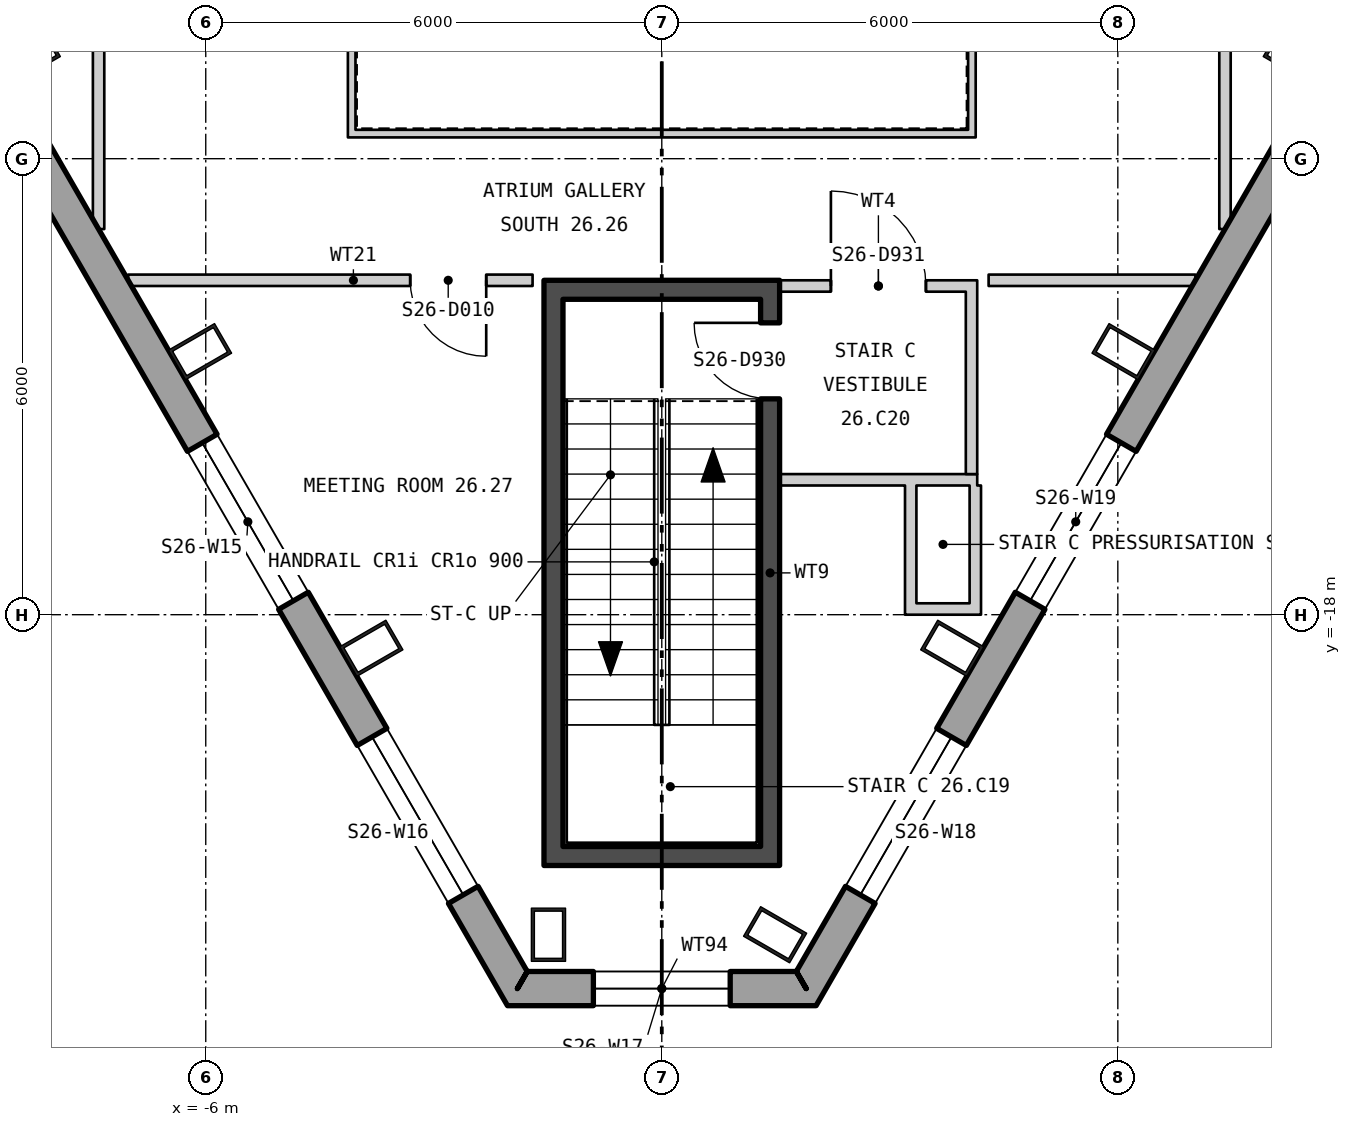
"""IFC4 building model, lengths in metres.
Left out: names, types, materials, properties, quantities, classifications, styles, units other than length and angle.
Written with IfcOpenShell. Run it as: python <this file> out.ifc"""

import sys

from ifc_helpers import new_model, si_unit, direction, frame, frame_2d, origin, origin_2d, place, context, subcontext, project, spatial, polyline, rectangle, hollow_rectangle, outline, extrude, element, fill, save


model = new_model("IFC4")
c1 = context("Model", 3, precision=1e-05, world=origin(), true_north=direction((0.0, 1.0)))
c2 = subcontext(c1, "Body", "Model", "MODEL_VIEW")
j1 = project(units=[si_unit("LENGTHUNIT", "METRE"), si_unit("PLANEANGLEUNIT", "RADIAN")], contexts=[c1])
p1 = place(None, origin())
s1 = spatial("IfcSite", under=j1, at=p1, CompositionType="ELEMENT")
p2 = place(p1, origin())
s2 = spatial("IfcBuilding", under=s1, at=p2, CompositionType="ELEMENT")
p3 = place(p2, frame((0.0, 0.0, 329.4)))
s3 = spatial("IfcBuildingStorey", under=s2, at=p3, CompositionType="ELEMENT", Elevation=329.4)
for number, where, z_axis, x_axis in (
    (1, (-8.328, -10.636, 0.0), (0.0, 0.0, 1.0), (0.5, -0.866, 0.0)),
    (2, (-6.075, -14.539, 0.0), (0.0, 0.0, 1.0), (0.5, -0.866, 0.0)),
    (3, (-3.821, -18.442, 0.0), (0.0, 0.0, 1.0), (0.5, -0.866, 0.0)),
    (4, (-1.491, -22.211, 0.0), (0.0, 0.0, 1.0), (1.0, 0.0, 0.0)),
    (5, (1.491, -22.211, 0.0), (0.0, 0.0, 1.0), (0.5, 0.866, 0.0)),
    (6, (3.821, -18.442, 0.0), (0.0, 0.0, 1.0), (0.5, 0.866, 0.0)),
    (7, (6.075, -14.539, 0.0), (0.0, 0.0, 1.0), (0.5, 0.866, 0.0)),
    (8, (8.328, -10.636, 0.0), (0.0, 0.0, 1.0), (0.5, 0.866, 0.0)),
):
    element("IfcColumn", number, at=place(p3, frame(where, z_axis=z_axis, x_axis=x_axis)), inside=s3, PredefinedType="COLUMN", context=c2, shape_type="SweptSolid", body=[
        extrude(hollow_rectangle(XDim=0.45, YDim=0.7, WallThickness=0.04, at=origin_2d()), origin(), (0.0, 0.0, 1.0), 4.2),
    ])
p4 = place(p3, frame((-24.765, 16.684, -0.18), z_axis=(0.0, 0.0, 1.0), x_axis=(0.500000141277, -0.866025322218, 0.0)))
e9 = element("IfcWall", 9, at=p4, inside=s3, PredefinedType="SOLIDWALL", context=c2, shape_type="SweptSolid", body=[
    extrude(outline(polyline([(-0.13, -0.225), (45.86, -0.225), (45.6, 0.225), (0.13, 0.225), (-0.13, -0.225)])), origin(), (0.0, 0.0, 1.0), 3.98),
])
p5 = place(p4, frame((1.424, 0.0, 1.08)))
e10 = element("IfcOpeningElement", 10, at=p5, cuts=e9, PredefinedType="OPENING", context=c2, shape_type="SweptSolid", body=[
    extrude(rectangle(XDim=2.4, YDim=2.3, at=frame_2d((1.2, 1.15))), frame((0.0, 0.235, 0.0), z_axis=(0.0, -1.0, 0.0), x_axis=(1.0, 0.0, 0.0)), (0.0, 0.0, 1.0), 0.47),
])
p6 = place(p4, frame((5.892, 0.0, 1.08)))
e11 = element("IfcOpeningElement", 11, at=p6, cuts=e9, PredefinedType="OPENING", context=c2, shape_type="SweptSolid", body=[
    extrude(rectangle(XDim=2.4, YDim=2.3, at=frame_2d((1.2, 1.15))), frame((0.0, 0.235, 0.0), z_axis=(0.0, -1.0, 0.0), x_axis=(1.0, 0.0, 0.0)), (0.0, 0.0, 1.0), 0.47),
])
p7 = place(p4, frame((10.399, 0.0, 1.08)))
e12 = element("IfcOpeningElement", 12, at=p7, cuts=e9, PredefinedType="OPENING", context=c2, shape_type="SweptSolid", body=[
    extrude(rectangle(XDim=2.4, YDim=2.3, at=frame_2d((1.2, 1.15))), frame((0.0, 0.235, 0.0), z_axis=(0.0, -1.0, 0.0), x_axis=(1.0, 0.0, 0.0)), (0.0, 0.0, 1.0), 0.47),
])
p8 = place(p4, frame((19.412, 0.0, 1.08)))
e13 = element("IfcOpeningElement", 13, at=p8, cuts=e9, PredefinedType="OPENING", context=c2, shape_type="SweptSolid", body=[
    extrude(rectangle(XDim=2.4, YDim=2.3, at=frame_2d((1.2, 1.15))), frame((0.0, 0.235, 0.0), z_axis=(0.0, -1.0, 0.0), x_axis=(1.0, 0.0, 0.0)), (0.0, 0.0, 1.0), 0.47),
])
p9 = place(p4, frame((23.918, 0.0, 1.08)))
e14 = element("IfcOpeningElement", 14, at=p9, cuts=e9, PredefinedType="OPENING", context=c2, shape_type="SweptSolid", body=[
    extrude(rectangle(XDim=2.4, YDim=2.3, at=frame_2d((1.2, 1.15))), frame((0.0, 0.235, 0.0), z_axis=(0.0, -1.0, 0.0), x_axis=(1.0, 0.0, 0.0)), (0.0, 0.0, 1.0), 0.47),
])
p10 = place(p4, frame((28.425, 0.0, 1.08)))
e15 = element("IfcOpeningElement", 15, at=p10, cuts=e9, PredefinedType="OPENING", context=c2, shape_type="SweptSolid", body=[
    extrude(rectangle(XDim=2.4, YDim=2.3, at=frame_2d((1.2, 1.15))), frame((0.0, 0.235, 0.0), z_axis=(0.0, -1.0, 0.0), x_axis=(1.0, 0.0, 0.0)), (0.0, 0.0, 1.0), 0.47),
])
p11 = place(p4, frame((37.438, 0.0, 1.08)))
e16 = element("IfcOpeningElement", 16, at=p11, cuts=e9, PredefinedType="OPENING", context=c2, shape_type="SweptSolid", body=[
    extrude(rectangle(XDim=2.4, YDim=2.3, at=frame_2d((1.2, 1.15))), frame((0.0, 0.235, 0.0), z_axis=(0.0, -1.0, 0.0), x_axis=(1.0, 0.0, 0.0)), (0.0, 0.0, 1.0), 0.47),
])
p12 = place(p4, frame((41.907, 0.0, 1.08)))
e17 = element("IfcOpeningElement", 17, at=p12, cuts=e9, PredefinedType="OPENING", context=c2, shape_type="SweptSolid", body=[
    extrude(rectangle(XDim=2.4, YDim=2.3, at=frame_2d((1.2, 1.15))), frame((0.0, 0.235, 0.0), z_axis=(0.0, -1.0, 0.0), x_axis=(1.0, 0.0, 0.0)), (0.0, 0.0, 1.0), 0.47),
])
p13 = place(p3, frame((-1.9, -22.92, -0.18), z_axis=(0.0, 0.0, 1.0), x_axis=(1.0, 0.0, 0.0)))
e18 = element("IfcWall", 18, at=p13, inside=s3, PredefinedType="SOLIDWALL", context=c2, shape_type="SweptSolid", body=[
    extrude(outline(polyline([(-0.13, -0.225), (3.93, -0.225), (3.67, 0.225), (0.13, 0.225), (-0.13, -0.225)])), origin(), (0.0, 0.0, 1.0), 3.98),
])
p14 = place(p13, frame((1.0, 0.0, 1.08)))
e19 = element("IfcOpeningElement", 19, at=p14, cuts=e18, PredefinedType="OPENING", context=c2, shape_type="SweptSolid", body=[
    extrude(rectangle(XDim=1.8, YDim=2.3, at=frame_2d((0.9, 1.15))), frame((0.0, 0.235, 0.0), z_axis=(0.0, -1.0, 0.0), x_axis=(1.0, 0.0, 0.0)), (0.0, 0.0, 1.0), 0.47),
])
p15 = place(p3, frame((1.9, -22.92, -0.18), z_axis=(0.0, 0.0, 1.0), x_axis=(0.500000141277, 0.866025322218, 0.0)))
e20 = element("IfcWall", 20, at=p15, inside=s3, PredefinedType="SOLIDWALL", context=c2, shape_type="SweptSolid", body=[
    extrude(outline(polyline([(-0.13, -0.225), (45.86, -0.225), (45.6, 0.225), (0.13, 0.225), (-0.13, -0.225)])), origin(), (0.0, 0.0, 1.0), 3.98),
])
p16 = place(p15, frame((1.424, 0.0, 1.08)))
e21 = element("IfcOpeningElement", 21, at=p16, cuts=e20, PredefinedType="OPENING", context=c2, shape_type="SweptSolid", body=[
    extrude(rectangle(XDim=2.4, YDim=2.3, at=frame_2d((1.2, 1.15))), frame((0.0, 0.235, 0.0), z_axis=(0.0, -1.0, 0.0), x_axis=(1.0, 0.0, 0.0)), (0.0, 0.0, 1.0), 0.47),
])
p17 = place(p15, frame((5.892, 0.0, 1.08)))
e22 = element("IfcOpeningElement", 22, at=p17, cuts=e20, PredefinedType="OPENING", context=c2, shape_type="SweptSolid", body=[
    extrude(rectangle(XDim=2.4, YDim=2.3, at=frame_2d((1.2, 1.15))), frame((0.0, 0.235, 0.0), z_axis=(0.0, -1.0, 0.0), x_axis=(1.0, 0.0, 0.0)), (0.0, 0.0, 1.0), 0.47),
])
p18 = place(p15, frame((14.905, 0.0, 1.08)))
e23 = element("IfcOpeningElement", 23, at=p18, cuts=e20, PredefinedType="OPENING", context=c2, shape_type="SweptSolid", body=[
    extrude(rectangle(XDim=2.4, YDim=2.3, at=frame_2d((1.2, 1.15))), frame((0.0, 0.235, 0.0), z_axis=(0.0, -1.0, 0.0), x_axis=(1.0, 0.0, 0.0)), (0.0, 0.0, 1.0), 0.47),
])
p19 = place(p15, frame((19.412, 0.0, 1.08)))
e24 = element("IfcOpeningElement", 24, at=p19, cuts=e20, PredefinedType="OPENING", context=c2, shape_type="SweptSolid", body=[
    extrude(rectangle(XDim=2.4, YDim=2.3, at=frame_2d((1.2, 1.15))), frame((0.0, 0.235, 0.0), z_axis=(0.0, -1.0, 0.0), x_axis=(1.0, 0.0, 0.0)), (0.0, 0.0, 1.0), 0.47),
])
p20 = place(p15, frame((23.918, 0.0, 1.08)))
e25 = element("IfcOpeningElement", 25, at=p20, cuts=e20, PredefinedType="OPENING", context=c2, shape_type="SweptSolid", body=[
    extrude(rectangle(XDim=2.4, YDim=2.3, at=frame_2d((1.2, 1.15))), frame((0.0, 0.235, 0.0), z_axis=(0.0, -1.0, 0.0), x_axis=(1.0, 0.0, 0.0)), (0.0, 0.0, 1.0), 0.47),
])
p21 = place(p15, frame((32.932, 0.0, 1.08)))
e26 = element("IfcOpeningElement", 26, at=p21, cuts=e20, PredefinedType="OPENING", context=c2, shape_type="SweptSolid", body=[
    extrude(rectangle(XDim=2.4, YDim=2.3, at=frame_2d((1.2, 1.15))), frame((0.0, 0.235, 0.0), z_axis=(0.0, -1.0, 0.0), x_axis=(1.0, 0.0, 0.0)), (0.0, 0.0, 1.0), 0.47),
])
p22 = place(p15, frame((37.438, 0.0, 1.08)))
e27 = element("IfcOpeningElement", 27, at=p22, cuts=e20, PredefinedType="OPENING", context=c2, shape_type="SweptSolid", body=[
    extrude(rectangle(XDim=2.4, YDim=2.3, at=frame_2d((1.2, 1.15))), frame((0.0, 0.235, 0.0), z_axis=(0.0, -1.0, 0.0), x_axis=(1.0, 0.0, 0.0)), (0.0, 0.0, 1.0), 0.47),
])
p23 = place(p15, frame((41.907, 0.0, 1.08)))
e28 = element("IfcOpeningElement", 28, at=p23, cuts=e20, PredefinedType="OPENING", context=c2, shape_type="SweptSolid", body=[
    extrude(rectangle(XDim=2.4, YDim=2.3, at=frame_2d((1.2, 1.15))), frame((0.0, 0.235, 0.0), z_axis=(0.0, -1.0, 0.0), x_axis=(1.0, 0.0, 0.0)), (0.0, 0.0, 1.0), 0.47),
])
p24 = place(p3, frame((-4.13, -11.67, 0.0), z_axis=(0.0, 0.0, 1.0), x_axis=(1.0, 0.0, 0.0)))
e29 = element("IfcWall", 29, at=p24, inside=s3, PredefinedType="PARTITIONING", context=c2, shape_type="SweptSolid", body=[
    extrude(rectangle(XDim=8.26, YDim=0.1, at=frame_2d((4.13, 0.0))), origin(), (0.0, 0.0, 1.0), 4.0),
])
for number, where, z_axis, x_axis in (
    (30, (4.08, -11.62, 0.0), (0.0, 0.0, 1.0), (0.0, 1.0, 0.0)),
    (31, (-4.08, -3.58, 0.0), (0.0, 0.0, 1.0), (0.0, -1.0, 0.0)),
):
    element("IfcWall", number, at=place(p3, frame(where, z_axis=z_axis, x_axis=x_axis)), inside=s3, PredefinedType="PARTITIONING", context=c2, shape_type="SweptSolid", body=[
        extrude(rectangle(XDim=8.04, YDim=0.1, at=frame_2d((4.02, 0.0))), origin(), (0.0, 0.0, 1.0), 4.0),
    ])
p25 = place(p3, frame((-1.425, -21.05, 0.0), z_axis=(0.0, 0.0, 1.0), x_axis=(0.0, 1.0, 0.0)))
e32 = element("IfcWall", 32, at=p25, inside=s3, PredefinedType="SHEAR", context=c2, shape_type="SweptSolid", body=[
    extrude(rectangle(XDim=7.2, YDim=0.25, at=frame_2d((3.6, 0.0))), origin(), (0.0, 0.0, 1.0), 4.0),
])
p26 = place(p3, frame((1.425, -21.05, 0.0), z_axis=(0.0, 0.0, 1.0), x_axis=(0.0, 1.0, 0.0)))
e33 = element("IfcWall", 33, at=p26, inside=s3, PredefinedType="SHEAR", context=c2, shape_type="SweptSolid", body=[
    extrude(rectangle(XDim=7.2, YDim=0.25, at=frame_2d((3.6, 0.0))), origin(), (0.0, 0.0, 1.0), 4.0),
])
p27 = place(p26, frame((5.89, 0.0, 0.0)))
e34 = element("IfcOpeningElement", 34, at=p27, cuts=e33, PredefinedType="OPENING", context=c2, shape_type="SweptSolid", body=[
    extrude(rectangle(XDim=1.0, YDim=2.1, at=frame_2d((0.5, 1.05))), frame((0.0, 0.135, 0.0), z_axis=(0.0, -1.0, 0.0), x_axis=(1.0, 0.0, 0.0)), (0.0, 0.0, 1.0), 0.27),
])
for number, where, z_axis, x_axis in (
    (35, (-1.55, -21.175, 0.0), (0.0, 0.0, 1.0), (1.0, 0.0, 0.0)),
    (36, (-1.55, -13.725, 0.0), (0.0, 0.0, 1.0), (1.0, 0.0, 0.0)),
):
    element("IfcWall", number, at=place(p3, frame(where, z_axis=z_axis, x_axis=x_axis)), inside=s3, PredefinedType="SHEAR", context=c2, shape_type="SweptSolid", body=[
        extrude(rectangle(XDim=3.1, YDim=0.25, at=frame_2d((1.55, 0.0))), origin(), (0.0, 0.0, 1.0), 4.0),
    ])
p28 = place(p3, frame((1.55, -16.225, 0.0), z_axis=(0.0, 0.0, 1.0), x_axis=(1.0, 0.0, 0.0)))
e37 = element("IfcWall", 37, at=p28, inside=s3, PredefinedType="PARTITIONING", context=c2, shape_type="SweptSolid", body=[
    extrude(rectangle(XDim=2.6, YDim=0.15, at=frame_2d((1.3, 0.0))), origin(), (0.0, 0.0, 1.0), 4.0),
])
p29 = place(p3, frame((4.075, -16.15, 0.0), z_axis=(0.0, 0.0, 1.0), x_axis=(0.0, 1.0, 0.0)))
e38 = element("IfcWall", 38, at=p29, inside=s3, PredefinedType="PARTITIONING", context=c2, shape_type="SweptSolid", body=[
    extrude(rectangle(XDim=2.4, YDim=0.15, at=frame_2d((1.2, 0.0))), origin(), (0.0, 0.0, 1.0), 4.0),
])
p30 = place(p3, frame((1.55, -13.675, 0.0), z_axis=(0.0, 0.0, 1.0), x_axis=(1.0, 0.0, 0.0)))
e39 = element("IfcWall", 39, at=p30, inside=s3, PredefinedType="PARTITIONING", context=c2, shape_type="SweptSolid", body=[
    extrude(rectangle(XDim=2.6, YDim=0.15, at=frame_2d((1.3, 0.0))), origin(), (0.0, 0.0, 1.0), 3.21),
])
p31 = place(p30, frame((0.675, 0.0, 0.0)))
e40 = element("IfcOpeningElement", 40, at=p31, cuts=e39, PredefinedType="OPENING", context=c2, shape_type="SweptSolid", body=[
    extrude(rectangle(XDim=1.25, YDim=2.1, at=frame_2d((0.625, 1.05))), frame((0.0, 0.085, 0.0), z_axis=(0.0, -1.0, 0.0), x_axis=(1.0, 0.0, 0.0)), (0.0, 0.0, 1.0), 0.17),
])
p32 = place(p3, frame((3.275, -18.0, 0.0), z_axis=(0.0, 0.0, 1.0), x_axis=(0.0, 1.0, 0.0)))
e41 = element("IfcWall", 41, at=p32, inside=s3, PredefinedType="PARTITIONING", context=c2, shape_type="SweptSolid", body=[
    extrude(rectangle(XDim=1.7, YDim=0.15, at=frame_2d((0.85, 0.0))), origin(), (0.0, 0.0, 1.0), 3.55),
])
p33 = place(p3, frame((3.35, -17.925, 0.0), z_axis=(0.0, 0.0, 1.0), x_axis=(1.0, 0.0, 0.0)))
e42 = element("IfcWall", 42, at=p33, inside=s3, PredefinedType="PARTITIONING", context=c2, shape_type="SweptSolid", body=[
    extrude(rectangle(XDim=0.7, YDim=0.15, at=frame_2d((0.35, 0.0))), origin(), (0.0, 0.0, 1.0), 4.0),
])
p34 = place(p3, frame((4.125, -18.0, 0.0), z_axis=(0.0, 0.0, 1.0), x_axis=(0.0, 1.0, 0.0)))
e43 = element("IfcWall", 43, at=p34, inside=s3, PredefinedType="PARTITIONING", context=c2, shape_type="SweptSolid", body=[
    extrude(rectangle(XDim=1.7, YDim=0.15, at=frame_2d((0.85, 0.0))), origin(), (0.0, 0.0, 1.0), 4.0),
])
p35 = place(p3, frame((-7.41, -12.926, 0.0), z_axis=(0.0, 0.0, 1.0), x_axis=(0.0, 1.0, 0.0)))
e44 = element("IfcWall", 44, at=p35, inside=s3, PredefinedType="PARTITIONING", context=c2, shape_type="SweptSolid", body=[
    extrude(rectangle(XDim=16.926, YDim=0.15, at=frame_2d((8.463, 0.0))), origin(), (0.0, 0.0, 1.0), 4.0),
])
p36 = place(p35, frame((3.512, 0.0, 0.0)))
e45 = element("IfcOpeningElement", 45, at=p36, cuts=e44, PredefinedType="OPENING", context=c2, shape_type="SweptSolid", body=[
    extrude(rectangle(XDim=1.0, YDim=2.1, at=frame_2d((0.5, 1.05))), frame((0.0, 0.085, 0.0), z_axis=(0.0, -1.0, 0.0), x_axis=(1.0, 0.0, 0.0)), (0.0, 0.0, 1.0), 0.17),
])
p37 = place(p35, frame((11.427, 0.0, 0.0)))
e46 = element("IfcOpeningElement", 46, at=p37, cuts=e44, PredefinedType="OPENING", context=c2, shape_type="SweptSolid", body=[
    extrude(rectangle(XDim=1.0, YDim=2.1, at=frame_2d((0.5, 1.05))), frame((0.0, 0.085, 0.0), z_axis=(0.0, -1.0, 0.0), x_axis=(1.0, 0.0, 0.0)), (0.0, 0.0, 1.0), 0.17),
])
p38 = place(p35, frame((15.526, 0.0, 0.0)))
e47 = element("IfcOpeningElement", 47, at=p38, cuts=e44, PredefinedType="OPENING", context=c2, shape_type="SweptSolid", body=[
    extrude(rectangle(XDim=1.0, YDim=2.1, at=frame_2d((0.5, 1.05))), frame((0.0, 0.085, 0.0), z_axis=(0.0, -1.0, 0.0), x_axis=(1.0, 0.0, 0.0)), (0.0, 0.0, 1.0), 0.17),
])
p39 = place(p3, frame((-7.021, -13.6, 0.0), z_axis=(0.0, 0.0, 1.0), x_axis=(1.0, 0.0, 0.0)))
e48 = element("IfcWall", 48, at=p39, inside=s3, PredefinedType="PARTITIONING", context=c2, shape_type="SweptSolid", body=[
    extrude(rectangle(XDim=0.606, YDim=0.15, at=frame_2d((0.303, 0.0))), origin(), (0.0, 0.0, 1.0), 4.0),
])
p40 = place(p3, frame((-6.415, -13.6, 0.0), z_axis=(0.0, 0.0, 1.0), x_axis=(1.0, 0.0, 0.0)))
e49 = element("IfcWall", 49, at=p40, inside=s3, PredefinedType="PARTITIONING", context=c2, shape_type="SweptSolid", body=[
    extrude(rectangle(XDim=4.715, YDim=0.15, at=frame_2d((2.357, 0.0))), origin(), (0.0, 0.0, 1.0), 3.21),
])
p41 = place(p40, frame((3.105, 0.0, 0.0)))
e50 = element("IfcOpeningElement", 50, at=p41, cuts=e49, PredefinedType="OPENING", context=c2, shape_type="SweptSolid", body=[
    extrude(rectangle(XDim=1.0, YDim=2.1, at=frame_2d((0.5, 1.05))), frame((0.0, 0.085, 0.0), z_axis=(0.0, -1.0, 0.0), x_axis=(1.0, 0.0, 0.0)), (0.0, 0.0, 1.0), 0.17),
])
p42 = place(p3, frame((4.3, -13.6, 0.0), z_axis=(0.0, 0.0, 1.0), x_axis=(1.0, 0.0, 0.0)))
e51 = element("IfcWall", 51, at=p42, inside=s3, PredefinedType="PARTITIONING", context=c2, shape_type="SweptSolid", body=[
    extrude(rectangle(XDim=2.115, YDim=0.15, at=frame_2d((1.058, 0.0))), origin(), (0.0, 0.0, 1.0), 3.21),
])
p43 = place(p3, frame((6.415, -13.6, 0.0), z_axis=(0.0, 0.0, 1.0), x_axis=(1.0, 0.0, 0.0)))
e52 = element("IfcWall", 52, at=p43, inside=s3, PredefinedType="PARTITIONING", context=c2, shape_type="SweptSolid", body=[
    extrude(rectangle(XDim=0.606, YDim=0.15, at=frame_2d((0.303, 0.0))), origin(), (0.0, 0.0, 1.0), 4.0),
])
p44 = place(p3, frame((7.41, -12.926, 0.0), z_axis=(0.0, 0.0, 1.0), x_axis=(0.0, 1.0, 0.0)))
e53 = element("IfcWall", 53, at=p44, inside=s3, PredefinedType="PARTITIONING", context=c2, shape_type="SweptSolid", body=[
    extrude(rectangle(XDim=15.138, YDim=0.15, at=frame_2d((7.569, 0.0))), origin(), (0.0, 0.0, 1.0), 4.0),
])
p45 = place(p44, frame((3.512, 0.0, 0.0)))
e54 = element("IfcOpeningElement", 54, at=p45, cuts=e53, PredefinedType="OPENING", context=c2, shape_type="SweptSolid", body=[
    extrude(rectangle(XDim=1.0, YDim=2.1, at=frame_2d((0.5, 1.05))), frame((0.0, 0.085, 0.0), z_axis=(0.0, -1.0, 0.0), x_axis=(1.0, 0.0, 0.0)), (0.0, 0.0, 1.0), 0.17),
])
p46 = place(p44, frame((11.427, 0.0, 0.0)))
e55 = element("IfcOpeningElement", 55, at=p46, cuts=e53, PredefinedType="OPENING", context=c2, shape_type="SweptSolid", body=[
    extrude(rectangle(XDim=1.0, YDim=2.1, at=frame_2d((0.5, 1.05))), frame((0.0, 0.085, 0.0), z_axis=(0.0, -1.0, 0.0), x_axis=(1.0, 0.0, 0.0)), (0.0, 0.0, 1.0), 0.17),
])
p47 = place(p11, origin())
e56 = element("IfcWindow", 56, at=p47, inside=s3, PartitioningType="SINGLE_PANEL", PredefinedType="WINDOW", context=c2, shape_type="SweptSolid", body=[
    extrude(rectangle(XDim=2.4, YDim=2.3, at=frame_2d((1.2, 1.15))), frame((0.0, 0.105, 0.0), z_axis=(0.0, -1.0, 0.0), x_axis=(1.0, 0.0, 0.0)), (0.0, 0.0, 1.0), 0.06),
])
fill(e16, e56)
p48 = place(p12, origin())
e57 = element("IfcWindow", 57, at=p48, inside=s3, PartitioningType="SINGLE_PANEL", PredefinedType="WINDOW", context=c2, shape_type="SweptSolid", body=[
    extrude(rectangle(XDim=2.4, YDim=2.3, at=frame_2d((1.2, 1.15))), frame((0.0, 0.105, 0.0), z_axis=(0.0, -1.0, 0.0), x_axis=(1.0, 0.0, 0.0)), (0.0, 0.0, 1.0), 0.06),
])
fill(e17, e57)
p49 = place(p14, origin())
e58 = element("IfcWindow", 58, at=p49, inside=s3, PartitioningType="SINGLE_PANEL", PredefinedType="WINDOW", context=c2, shape_type="SweptSolid", body=[
    extrude(rectangle(XDim=1.8, YDim=2.3, at=frame_2d((0.9, 1.15))), frame((0.0, 0.105, 0.0), z_axis=(0.0, -1.0, 0.0), x_axis=(1.0, 0.0, 0.0)), (0.0, 0.0, 1.0), 0.06),
])
fill(e19, e58)
p50 = place(p16, origin())
e59 = element("IfcWindow", 59, at=p50, inside=s3, PartitioningType="SINGLE_PANEL", PredefinedType="WINDOW", context=c2, shape_type="SweptSolid", body=[
    extrude(rectangle(XDim=2.4, YDim=2.3, at=frame_2d((1.2, 1.15))), frame((0.0, 0.105, 0.0), z_axis=(0.0, -1.0, 0.0), x_axis=(1.0, 0.0, 0.0)), (0.0, 0.0, 1.0), 0.06),
])
fill(e21, e59)
p51 = place(p17, origin())
e60 = element("IfcWindow", 60, at=p51, inside=s3, PartitioningType="SINGLE_PANEL", PredefinedType="WINDOW", context=c2, shape_type="SweptSolid", body=[
    extrude(rectangle(XDim=2.4, YDim=2.3, at=frame_2d((1.2, 1.15))), frame((0.0, 0.105, 0.0), z_axis=(0.0, -1.0, 0.0), x_axis=(1.0, 0.0, 0.0)), (0.0, 0.0, 1.0), 0.06),
])
fill(e22, e60)
p52 = place(p27, origin())
e61 = element("IfcDoor", 61, at=p52, inside=s3, OperationType="SINGLE_SWING_LEFT", PredefinedType="DOOR", context=c2, shape_type="SweptSolid", body=[
    extrude(rectangle(XDim=1.0, YDim=2.1, at=frame_2d((0.5, 1.05))), frame((0.0, 0.025, 0.0), z_axis=(0.0, -1.0, 0.0), x_axis=(1.0, 0.0, 0.0)), (0.0, 0.0, 1.0), 0.05),
])
fill(e34, e61)
p53 = place(p31, origin())
e62 = element("IfcDoor", 62, at=p53, inside=s3, OperationType="SINGLE_SWING_RIGHT", PredefinedType="DOOR", context=c2, shape_type="SweptSolid", body=[
    extrude(rectangle(XDim=1.25, YDim=2.1, at=frame_2d((0.625, 1.05))), frame((0.0, 0.025, 0.0), z_axis=(0.0, -1.0, 0.0), x_axis=(1.0, 0.0, 0.0)), (0.0, 0.0, 1.0), 0.05),
])
fill(e40, e62)
p54 = place(p41, origin())
e63 = element("IfcDoor", 63, at=p54, inside=s3, OperationType="SINGLE_SWING_RIGHT", PredefinedType="DOOR", context=c2, shape_type="SweptSolid", body=[
    extrude(rectangle(XDim=1.0, YDim=2.1, at=frame_2d((0.5, 1.05))), frame((0.0, 0.025, 0.0), z_axis=(0.0, -1.0, 0.0), x_axis=(1.0, 0.0, 0.0)), (0.0, 0.0, 1.0), 0.05),
])
fill(e50, e63)
save(model, sys.argv[1])
